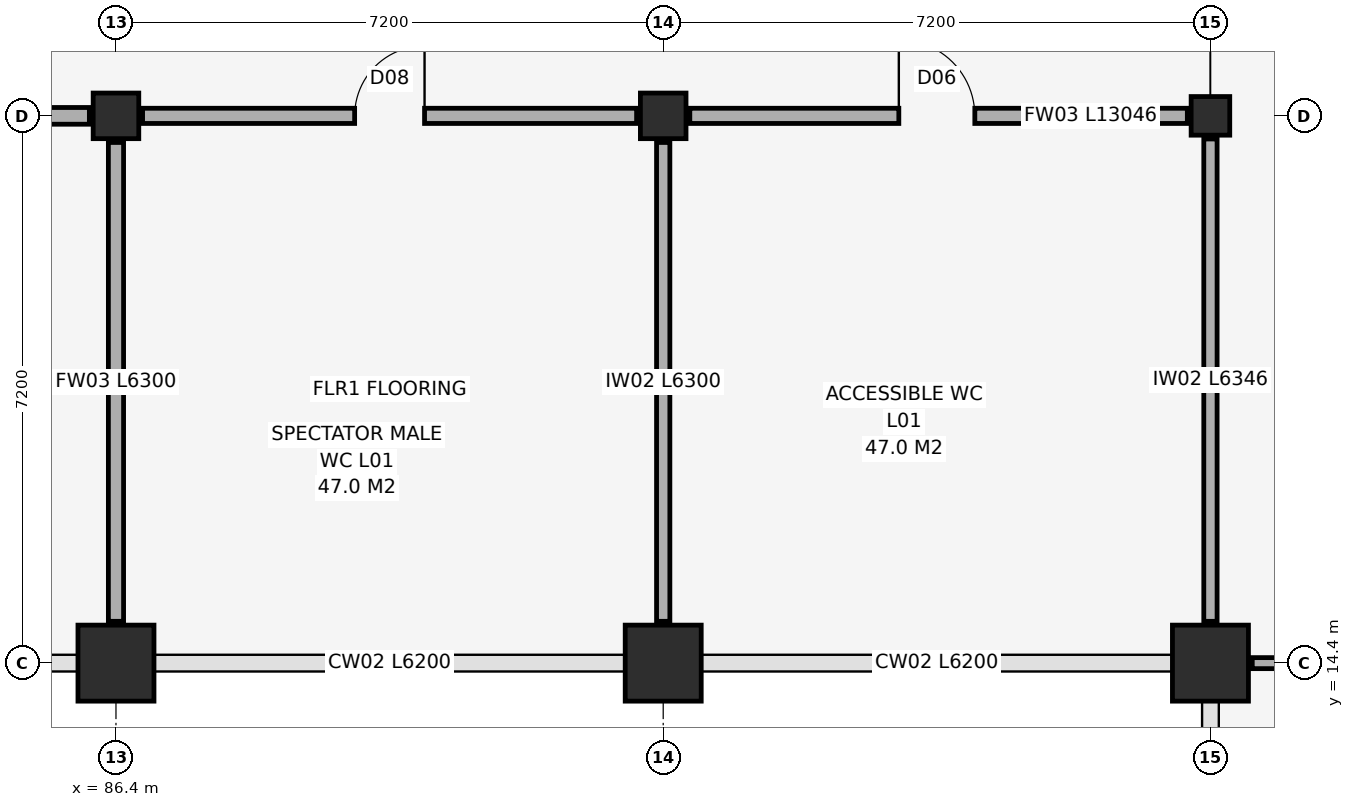
"""IFC4 building model, lengths in metres.
Left out: names, types, materials, properties, quantities, classifications, styles, units other than length and angle.
Written with IfcOpenShell. Run it as: python <this file> out.ifc"""

import sys

from ifc_helpers import new_model, si_unit, direction, frame, frame_2d, origin, origin_2d, place, context, subcontext, project, spatial, rectangle, hollow_circle, extrude, element, fill, save


model = new_model("IFC4")
c1 = context("Model", 3, precision=1e-05, world=origin(), true_north=direction((0.0, 1.0)))
c2 = subcontext(c1, "Body", "Model", "MODEL_VIEW")
j1 = project(units=[si_unit("LENGTHUNIT", "METRE"), si_unit("PLANEANGLEUNIT", "RADIAN")], contexts=[c1])
p1 = place(None, origin())
s1 = spatial("IfcSite", under=j1, at=p1, CompositionType="ELEMENT")
p2 = place(p1, origin())
s2 = spatial("IfcBuilding", under=s1, at=p2, CompositionType="ELEMENT")
p3 = place(p2, frame((0.0, 0.0, 5.4)))
s3 = spatial("IfcBuildingStorey", under=s2, at=p3, CompositionType="ELEMENT", Elevation=5.4)
p4 = place(p3, frame((86.4, 14.4, 0.0), z_axis=(0.0, 0.0, 1.0), x_axis=(1.0, 0.0, 0.0)))
e1 = element("IfcColumn", 1, at=p4, inside=s3, PredefinedType="COLUMN", context=c2, shape_type="SweptSolid", body=[
    extrude(rectangle(XDim=1.0, YDim=1.0, at=origin_2d()), origin(), (0.0, 0.0, 1.0), 4.8),
])
p5 = place(p3, frame((86.4, 21.6, 0.0), z_axis=(0.0, 0.0, 1.0), x_axis=(1.0, 0.0, 0.0)))
e2 = element("IfcColumn", 2, at=p5, inside=s3, PredefinedType="COLUMN", context=c2, shape_type="SweptSolid", body=[
    extrude(rectangle(XDim=0.6, YDim=0.6, at=origin_2d()), origin(), (0.0, 0.0, 1.0), 4.8),
])
p6 = place(p3, frame((93.6, 14.4, 0.0), z_axis=(0.0, 0.0, 1.0), x_axis=(1.0, 0.0, 0.0)))
e3 = element("IfcColumn", 3, at=p6, inside=s3, PredefinedType="COLUMN", context=c2, shape_type="SweptSolid", body=[
    extrude(rectangle(XDim=1.0, YDim=1.0, at=origin_2d()), origin(), (0.0, 0.0, 1.0), 4.8),
])
p7 = place(p3, frame((93.6, 21.6, 0.0), z_axis=(0.0, 0.0, 1.0), x_axis=(1.0, 0.0, 0.0)))
e4 = element("IfcColumn", 4, at=p7, inside=s3, PredefinedType="COLUMN", context=c2, shape_type="SweptSolid", body=[
    extrude(rectangle(XDim=0.6, YDim=0.6, at=origin_2d()), origin(), (0.0, 0.0, 1.0), 4.8),
])
p8 = place(p3, frame((100.8, 14.4, 0.0), z_axis=(0.0, 0.0, 1.0), x_axis=(1.0, 0.0, 0.0)))
e5 = element("IfcColumn", 5, at=p8, inside=s3, PredefinedType="COLUMN", context=c2, shape_type="SweptSolid", body=[
    extrude(rectangle(XDim=1.0, YDim=1.0, at=origin_2d()), origin(), (0.0, 0.0, 1.0), 4.8),
])
p9 = place(p3, frame((100.8, 21.6, 0.0), z_axis=(0.0, 0.0, 1.0), x_axis=(1.0, 0.0, 0.0)))
e6 = element("IfcColumn", 6, at=p9, inside=s3, PredefinedType="COLUMN", context=c2, shape_type="SweptSolid", body=[
    extrude(hollow_circle(Radius=0.254, WallThickness=0.022, at=origin_2d()), origin(), (0.0, 0.0, 1.0), 4.8),
])
p10 = place(p3, frame((79.55, 21.6, 0.0), z_axis=(0.0, 0.0, 1.0), x_axis=(1.0, 0.0, 0.0)))
e7 = element("IfcWall", 7, at=p10, inside=s3, PredefinedType="SOLIDWALL", context=c2, shape_type="SweptSolid", body=[
    extrude(rectangle(XDim=6.5, YDim=0.22, at=frame_2d((3.25, 0.0))), origin(), (0.0, 0.0, 1.0), 4.19),
])
p11 = place(p3, frame((86.4, 14.95, 0.0), z_axis=(0.0, 0.0, 1.0), x_axis=(0.0, 1.0, 0.0)))
e8 = element("IfcWall", 8, at=p11, inside=s3, PredefinedType="SOLIDWALL", context=c2, shape_type="SweptSolid", body=[
    extrude(rectangle(XDim=6.3, YDim=0.2, at=frame_2d((3.15, 0.0))), origin(), (0.0, 0.0, 1.0), 4.15),
])
p12 = place(p3, frame((86.75, 21.6, 0.0), z_axis=(0.0, 0.0, 1.0), x_axis=(1.0, 0.0, 0.0)))
e9 = element("IfcWall", 9, at=p12, inside=s3, PredefinedType="SOLIDWALL", context=c2, shape_type="SweptSolid", body=[
    extrude(rectangle(XDim=6.5, YDim=0.2, at=frame_2d((3.25, 0.0))), origin(), (0.0, 0.0, 1.0), 3.952),
])
p13 = place(p12, frame((2.79, 0.0, 0.0)))
e10 = element("IfcOpeningElement", 10, at=p13, cuts=e9, PredefinedType="OPENING", context=c2, shape_type="SweptSolid", body=[
    extrude(rectangle(XDim=0.92, YDim=2.1, at=frame_2d((0.46, 1.05))), frame((0.0, 0.115, 0.0), z_axis=(0.0, -1.0, 0.0), x_axis=(1.0, 0.0, 0.0)), (0.0, 0.0, 1.0), 0.23),
])
p14 = place(p3, frame((93.6, 14.95, 0.0), z_axis=(0.0, 0.0, 1.0), x_axis=(0.0, 1.0, 0.0)))
e11 = element("IfcWall", 11, at=p14, inside=s3, PredefinedType="PARTITIONING", context=c2, shape_type="SweptSolid", body=[
    extrude(rectangle(XDim=6.3, YDim=0.175, at=frame_2d((3.15, 0.0))), origin(), (0.0, 0.0, 1.0), 4.052),
])
p15 = place(p3, frame((93.95, 21.6, 0.0), z_axis=(0.0, 0.0, 1.0), x_axis=(1.0, 0.0, 0.0)))
e12 = element("IfcWall", 12, at=p15, inside=s3, PredefinedType="SOLIDWALL", context=c2, shape_type="SweptSolid", body=[
    extrude(rectangle(XDim=6.546, YDim=0.2, at=frame_2d((3.273, 0.0))), origin(), (0.0, 0.0, 1.0), 3.952),
])
p16 = place(p15, frame((2.75, 0.0, 0.0)))
e13 = element("IfcOpeningElement", 13, at=p16, cuts=e12, PredefinedType="OPENING", context=c2, shape_type="SweptSolid", body=[
    extrude(rectangle(XDim=1.0, YDim=2.1, at=frame_2d((0.5, 1.05))), frame((0.0, 0.115, 0.0), z_axis=(0.0, -1.0, 0.0), x_axis=(1.0, 0.0, 0.0)), (0.0, 0.0, 1.0), 0.23),
])
p17 = place(p3, frame((100.8, 14.95, 0.0), z_axis=(0.0, 0.0, 1.0), x_axis=(0.0, 1.0, 0.0)))
e14 = element("IfcWall", 14, at=p17, inside=s3, PredefinedType="PARTITIONING", context=c2, shape_type="SweptSolid", body=[
    extrude(rectangle(XDim=6.346, YDim=0.175, at=frame_2d((3.173, 0.0))), origin(), (0.0, 0.0, 1.0), 3.952),
])
p18 = place(p3, frame((101.35, 14.4, 0.0), z_axis=(0.0, 0.0, 1.0), x_axis=(1.0, 0.0, 0.0)))
e15 = element("IfcWall", 15, at=p18, inside=s3, PredefinedType="PARTITIONING", context=c2, shape_type="SweptSolid", body=[
    extrude(rectangle(XDim=13.4, YDim=0.145, at=frame_2d((6.7, 0.0))), origin(), (0.0, 0.0, 1.0), 4.54),
])
p19 = place(p18, frame((2.46, 0.0, 0.0)))
e16 = element("IfcOpeningElement", 16, at=p19, cuts=e15, PredefinedType="OPENING", context=c2, shape_type="SweptSolid", body=[
    extrude(rectangle(XDim=1.18, YDim=2.15, at=frame_2d((0.59, 1.075))), frame((0.0, 0.087, 0.0), z_axis=(0.0, -1.0, 0.0), x_axis=(1.0, 0.0, 0.0)), (0.0, 0.0, 1.0), 0.175),
])
p20 = place(p13, frame((0.92, 0.0, 0.0), z_axis=(0.0, 0.0, 1.0), x_axis=(-1.0, 0.0, 0.0)))
e17 = element("IfcDoor", 17, at=p20, inside=s3, OperationType="SINGLE_SWING_LEFT", PredefinedType="DOOR", context=c2, shape_type="SweptSolid", body=[
    extrude(rectangle(XDim=0.92, YDim=2.1, at=frame_2d((0.46, 1.05))), frame((0.0, 0.025, 0.0), z_axis=(0.0, -1.0, 0.0), x_axis=(1.0, 0.0, 0.0)), (0.0, 0.0, 1.0), 0.05),
])
fill(e10, e17)
p21 = place(p16, frame((1.0, 0.0, 0.0), z_axis=(0.0, 0.0, 1.0), x_axis=(-1.0, 0.0, 0.0)))
e18 = element("IfcDoor", 18, at=p21, inside=s3, OperationType="SINGLE_SWING_RIGHT", PredefinedType="DOOR", context=c2, shape_type="SweptSolid", body=[
    extrude(rectangle(XDim=1.0, YDim=2.1, at=frame_2d((0.5, 1.05))), frame((0.0, 0.025, 0.0), z_axis=(0.0, -1.0, 0.0), x_axis=(1.0, 0.0, 0.0)), (0.0, 0.0, 1.0), 0.05),
])
fill(e13, e18)
save(model, sys.argv[1])
